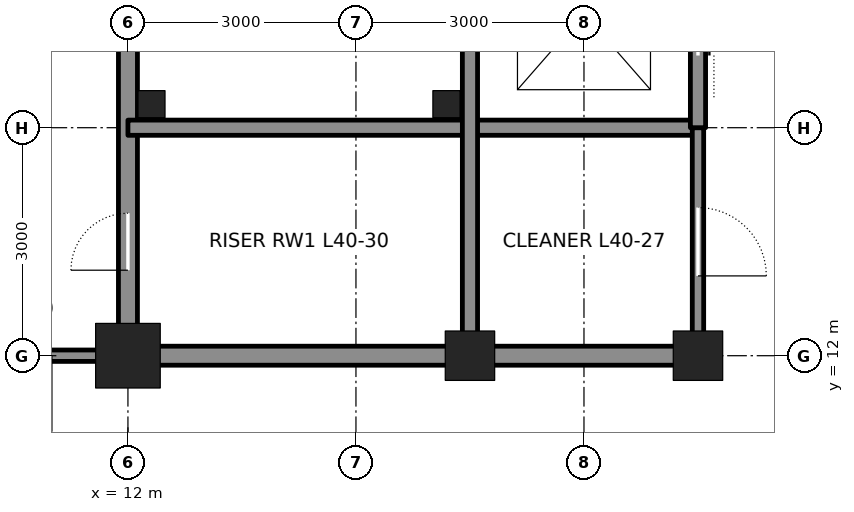
"""IFC4 building model, lengths in metres.
Left out: names, types, materials, properties, quantities, classifications, styles, units other than length and angle.
Written with IfcOpenShell. Run it as: python <this file> out.ifc"""

import sys

from ifc_helpers import new_model, si_unit, direction, frame, frame_2d, origin, origin_2d, place, context, subcontext, project, spatial, rectangle, hollow_rectangle, extrude, element, fill, save


model = new_model("IFC4")
c1 = context("Model", 3, precision=1e-05, world=origin(), true_north=direction((0.0, 1.0)))
c2 = subcontext(c1, "Body", "Model", "MODEL_VIEW")
j1 = project(units=[si_unit("LENGTHUNIT", "METRE"), si_unit("PLANEANGLEUNIT", "RADIAN")], contexts=[c1])
p1 = place(None, origin())
s1 = spatial("IfcSite", under=j1, at=p1, CompositionType="ELEMENT")
p2 = place(p1, origin())
s2 = spatial("IfcBuilding", under=s1, at=p2, CompositionType="ELEMENT")
p3 = place(p2, frame((0.0, 0.0, 184.5)))
s3 = spatial("IfcBuildingStorey", under=s2, at=p3, CompositionType="ELEMENT", Elevation=184.5)
p4 = place(p3, frame((12.0, 12.0, 0.0), z_axis=(0.0, 0.0, 1.0), x_axis=(1.0, 0.0, 0.0)))
e1 = element("IfcColumn", 1, at=p4, inside=s3, PredefinedType="COLUMN", context=c2, shape_type="SweptSolid", body=[
    extrude(hollow_rectangle(XDim=0.85, YDim=0.85, WallThickness=0.085, at=origin_2d()), origin(), (0.0, 0.0, 1.0), 4.2),
])
for number, where, z_axis, x_axis in (
    (2, (16.5, 12.0, 0.0), (0.0, 0.0, 1.0), (1.0, 0.0, 0.0)),
    (3, (19.5, 12.0, 0.0), (0.0, 0.0, 1.0), (1.0, 0.0, 0.0)),
):
    element("IfcColumn", number, at=place(p3, frame(where, z_axis=z_axis, x_axis=x_axis)), inside=s3, PredefinedType="COLUMN", context=c2, shape_type="SweptSolid", body=[
        extrude(hollow_rectangle(XDim=0.65, YDim=0.65, WallThickness=0.065, at=origin_2d()), origin(), (0.0, 0.0, 1.0), 4.2),
    ])
p5 = place(p3, frame((12.0, 12.25, 0.0), z_axis=(0.0, 0.0, 1.0), x_axis=(0.0, 1.0, 0.0)))
e4 = element("IfcWall", 4, at=p5, inside=s3, PredefinedType="SOLIDWALL", context=c2, shape_type="SweptSolid", body=[
    extrude(rectangle(XDim=8.5, YDim=0.25, at=frame_2d((4.25, 0.0))), origin(), (0.0, 0.0, 1.0), 3.113),
])
p6 = place(p5, frame((0.875, 0.0, 0.0)))
e5 = element("IfcOpeningElement", 5, at=p6, cuts=e4, PredefinedType="OPENING", context=c2, shape_type="SweptSolid", body=[
    extrude(rectangle(XDim=0.75, YDim=2.1, at=frame_2d((0.375, 1.05))), frame((0.0, 0.135, 0.0), z_axis=(0.0, -1.0, 0.0), x_axis=(1.0, 0.0, 0.0)), (0.0, 0.0, 1.0), 0.27),
])
p7 = place(p3, frame((12.25, 12.0, 0.0), z_axis=(0.0, 0.0, 1.0), x_axis=(1.0, 0.0, 0.0)))
e6 = element("IfcWall", 6, at=p7, inside=s3, PredefinedType="SOLIDWALL", context=c2, shape_type="SweptSolid", body=[
    extrude(rectangle(XDim=4.0, YDim=0.25, at=frame_2d((2.0, 0.0))), origin(), (0.0, 0.0, 1.0), 3.181),
])
p8 = place(p3, frame((16.75, 12.0, 0.0), z_axis=(0.0, 0.0, 1.0), x_axis=(1.0, 0.0, 0.0)))
e7 = element("IfcWall", 7, at=p8, inside=s3, PredefinedType="SOLIDWALL", context=c2, shape_type="SweptSolid", body=[
    extrude(rectangle(XDim=2.5, YDim=0.25, at=frame_2d((1.25, 0.0))), origin(), (0.0, 0.0, 1.0), 3.181),
])
p9 = place(p3, frame((12.0, 15.0, 0.0), z_axis=(0.0, 0.0, 1.0), x_axis=(1.0, 0.0, 0.0)))
e8 = element("IfcWall", 8, at=p9, inside=s3, PredefinedType="SOLIDWALL", context=c2, shape_type="SweptSolid", body=[
    extrude(rectangle(XDim=7.5, YDim=0.2, at=frame_2d((3.75, 0.0))), origin(), (0.0, 0.0, 1.0), 4.04),
])
p10 = place(p3, frame((16.5, 12.25, 0.0), z_axis=(0.0, 0.0, 1.0), x_axis=(0.0, 1.0, 0.0)))
e9 = element("IfcWall", 9, at=p10, inside=s3, PredefinedType="SOLIDWALL", context=c2, shape_type="SweptSolid", body=[
    extrude(rectangle(XDim=8.5, YDim=0.2, at=frame_2d((4.25, 0.0))), origin(), (0.0, 0.0, 1.0), 3.113),
])
p11 = place(p3, frame((19.5, 12.25, 0.0), z_axis=(0.0, 0.0, 1.0), x_axis=(0.0, 1.0, 0.0)))
e10 = element("IfcWall", 10, at=p11, inside=s3, PredefinedType="PARTITIONING", context=c2, shape_type="SweptSolid", body=[
    extrude(rectangle(XDim=2.75, YDim=0.15, at=frame_2d((1.375, 0.0))), origin(), (0.0, 0.0, 1.0), 3.065),
])
p12 = place(p11, frame((0.8, 0.0, 0.0)))
e11 = element("IfcOpeningElement", 11, at=p12, cuts=e10, PredefinedType="OPENING", context=c2, shape_type="SweptSolid", body=[
    extrude(rectangle(XDim=0.9, YDim=2.1, at=frame_2d((0.45, 1.05))), frame((0.0, 0.085, 0.0), z_axis=(0.0, -1.0, 0.0), x_axis=(1.0, 0.0, 0.0)), (0.0, 0.0, 1.0), 0.17),
])
p13 = place(p3, frame((19.5, 15.0, 0.0), z_axis=(0.0, 0.0, 1.0), x_axis=(0.0, 1.0, 0.0)))
e12 = element("IfcWall", 12, at=p13, inside=s3, PredefinedType="SOLIDWALL", context=c2, shape_type="SweptSolid", body=[
    extrude(rectangle(XDim=12.0, YDim=0.2, at=frame_2d((6.0, 0.0))), origin(), (0.0, 0.0, 1.0), 3.065),
])
p14 = place(p13, frame((0.95, 0.0, 0.0)))
e13 = element("IfcOpeningElement", 13, at=p14, cuts=e12, PredefinedType="OPENING", context=c2, shape_type="SweptSolid", body=[
    extrude(rectangle(XDim=1.1, YDim=2.1, at=frame_2d((0.55, 1.05))), frame((0.0, 0.11, 0.0), z_axis=(0.0, -1.0, 0.0), x_axis=(1.0, 0.0, 0.0)), (0.0, 0.0, 1.0), 0.22),
])
p15 = place(p13, frame((3.95, 0.0, 0.0)))
e14 = element("IfcOpeningElement", 14, at=p15, cuts=e12, PredefinedType="OPENING", context=c2, shape_type="SweptSolid", body=[
    extrude(rectangle(XDim=1.1, YDim=2.1, at=frame_2d((0.55, 1.05))), frame((0.0, 0.11, 0.0), z_axis=(0.0, -1.0, 0.0), x_axis=(1.0, 0.0, 0.0)), (0.0, 0.0, 1.0), 0.22),
])
p16 = place(p13, frame((6.95, 0.0, 0.0)))
e15 = element("IfcOpeningElement", 15, at=p16, cuts=e12, PredefinedType="OPENING", context=c2, shape_type="SweptSolid", body=[
    extrude(rectangle(XDim=1.1, YDim=2.1, at=frame_2d((0.55, 1.05))), frame((0.0, 0.11, 0.0), z_axis=(0.0, -1.0, 0.0), x_axis=(1.0, 0.0, 0.0)), (0.0, 0.0, 1.0), 0.22),
])
p17 = place(p13, frame((9.95, 0.0, 0.0)))
e16 = element("IfcOpeningElement", 16, at=p17, cuts=e12, PredefinedType="OPENING", context=c2, shape_type="SweptSolid", body=[
    extrude(rectangle(XDim=1.1, YDim=2.1, at=frame_2d((0.55, 1.05))), frame((0.0, 0.11, 0.0), z_axis=(0.0, -1.0, 0.0), x_axis=(1.0, 0.0, 0.0)), (0.0, 0.0, 1.0), 0.22),
])
p18 = place(p3, frame((9.0, 12.0, 0.0), z_axis=(0.0, 0.0, 1.0), x_axis=(1.0, 0.0, 0.0)))
e17 = element("IfcWall", 17, at=p18, inside=s3, PredefinedType="PARTITIONING", context=c2, shape_type="SweptSolid", body=[
    extrude(rectangle(XDim=3.0, YDim=0.15, at=frame_2d((1.5, 0.0))), origin(), (0.0, 0.0, 1.0), 3.271),
])
p19 = place(p18, frame((1.0, 0.0, 0.0)))
e18 = element("IfcOpeningElement", 18, at=p19, cuts=e17, PredefinedType="OPENING", context=c2, shape_type="SweptSolid", body=[
    extrude(rectangle(XDim=1.0, YDim=2.4, at=frame_2d((0.5, 1.2))), frame((0.0, 0.085, 0.0), z_axis=(0.0, -1.0, 0.0), x_axis=(1.0, 0.0, 0.0)), (0.0, 0.0, 1.0), 0.17),
])
for number, where, z_axis, x_axis in (
    (19, (12.31, 15.31, 0.0), (0.0, 0.0, 1.0), (1.0, 0.0, 0.0)),
    (20, (16.19, 15.31, 0.0), (0.0, 0.0, 1.0), (1.0, 0.0, 0.0)),
):
    element("IfcColumn", number, at=place(p3, frame(where, z_axis=z_axis, x_axis=x_axis)), inside=s3, PredefinedType="COLUMN", context=c2, shape_type="SweptSolid", body=[
        extrude(hollow_rectangle(XDim=0.356, YDim=0.356, WallThickness=0.015, at=origin_2d()), origin(), (0.0, 0.0, 1.0), 4.2),
    ])
p20 = place(p6, origin())
e21 = element("IfcDoor", 21, at=p20, inside=s3, OperationType="SINGLE_SWING_LEFT", PredefinedType="DOOR", context=c2, shape_type="SweptSolid", body=[
    extrude(rectangle(XDim=0.75, YDim=2.1, at=frame_2d((0.375, 1.05))), frame((0.0, 0.025, 0.0), z_axis=(0.0, -1.0, 0.0), x_axis=(1.0, 0.0, 0.0)), (0.0, 0.0, 1.0), 0.05),
])
fill(e5, e21)
p21 = place(p12, frame((0.9, 0.0, 0.0), z_axis=(0.0, 0.0, 1.0), x_axis=(-1.0, 0.0, 0.0)))
e22 = element("IfcDoor", 22, at=p21, inside=s3, OperationType="SINGLE_SWING_RIGHT", PredefinedType="DOOR", context=c2, shape_type="SweptSolid", body=[
    extrude(rectangle(XDim=0.9, YDim=2.1, at=frame_2d((0.45, 1.05))), frame((0.0, 0.025, 0.0), z_axis=(0.0, -1.0, 0.0), x_axis=(1.0, 0.0, 0.0)), (0.0, 0.0, 1.0), 0.05),
])
fill(e11, e22)
p22 = place(p14, origin())
e23 = element("IfcDoor", 23, at=p22, inside=s3, OperationType="DOUBLE_DOOR_SLIDING", PredefinedType="DOOR", context=c2, shape_type="SweptSolid", body=[
    extrude(rectangle(XDim=1.1, YDim=2.1, at=frame_2d((0.55, 1.05))), frame((0.0, 0.025, 0.0), z_axis=(0.0, -1.0, 0.0), x_axis=(1.0, 0.0, 0.0)), (0.0, 0.0, 1.0), 0.05),
])
fill(e13, e23)
save(model, sys.argv[1])
